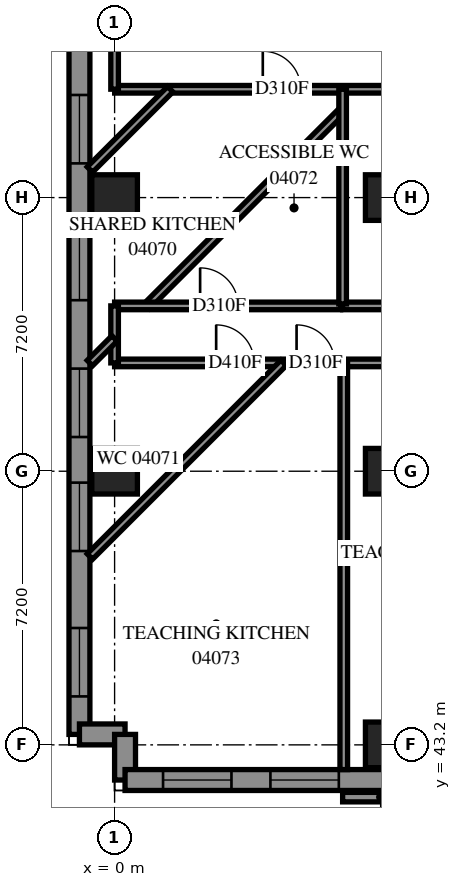
"""IFC4 building model, lengths in metres.
Left out: names, types, materials, properties, quantities, classifications, styles, units other than length and angle.
Written with IfcOpenShell. Run it as: python <this file> out.ifc"""

import sys

from ifc_helpers import new_model, si_unit, direction, frame, frame_2d, origin, origin_2d, place, context, subcontext, project, spatial, polyline, rectangle, outline, extrude, element, fill, save


model = new_model("IFC4")
c1 = context("Model", 3, precision=1e-05, world=origin(), true_north=direction((0.0, 1.0)))
c2 = subcontext(c1, "Body", "Model", "MODEL_VIEW")
j1 = project(units=[si_unit("LENGTHUNIT", "METRE"), si_unit("PLANEANGLEUNIT", "RADIAN")], contexts=[c1])
p1 = place(None, origin())
s1 = spatial("IfcSite", under=j1, at=p1, CompositionType="ELEMENT")
p2 = place(p1, origin())
s2 = spatial("IfcBuilding", under=s1, at=p2, CompositionType="ELEMENT")
p3 = place(p2, frame((0.0, 0.0, 18.6)))
s3 = spatial("IfcBuildingStorey", under=s2, at=p3, CompositionType="ELEMENT", Elevation=18.6)
for number, where, z_axis, x_axis in (
    (1, (0.0, 50.4, 0.0), (0.0, 0.0, 1.0), (1.0, 0.0, 0.0)),
    (2, (0.0, 57.6, 0.0), (0.0, 0.0, 1.0), (1.0, 0.0, 0.0)),
    (3, (7.2, 43.2, 0.0), (0.0, 0.0, 1.0), (1.0, 0.0, 0.0)),
    (4, (7.2, 50.4, 0.0), (0.0, 0.0, 1.0), (1.0, 0.0, 0.0)),
    (5, (7.2, 57.6, 0.0), (0.0, 0.0, 1.0), (1.0, 0.0, 0.0)),
):
    element("IfcColumn", number, at=place(p3, frame(where, z_axis=z_axis, x_axis=x_axis)), inside=s3, PredefinedType="COLUMN", context=c2, shape_type="SweptSolid", body=[
        extrude(rectangle(XDim=1.2, YDim=1.2, at=origin_2d()), origin(), (0.0, 0.0, 1.0), 3.8),
    ])
p4 = place(p3, frame((-0.925, 71.725, 0.0), z_axis=(0.0, 0.0, 1.0), x_axis=(0.0, -1.0, 0.0)))
e6 = element("IfcWall", 6, at=p4, inside=s3, PredefinedType="SOLIDWALL", context=c2, shape_type="SweptSolid", body=[
    extrude(outline(polyline([(-0.275, -0.275), (28.525, -0.275), (27.975, 0.275), (0.275, 0.275), (-0.275, -0.275)])), origin(), (0.0, 0.0, 1.0), 3.8),
])
p5 = place(p4, frame((1.0, 0.0, 0.7)))
e7 = element("IfcOpeningElement", 7, at=p5, cuts=e6, PredefinedType="OPENING", context=c2, shape_type="SweptSolid", body=[
    extrude(rectangle(XDim=1.8, YDim=2.4, at=frame_2d((0.9, 1.2))), frame((0.0, 0.285, 0.0), z_axis=(0.0, -1.0, 0.0), x_axis=(1.0, 0.0, 0.0)), (0.0, 0.0, 1.0), 0.57),
])
p6 = place(p4, frame((4.225, 0.0, 0.7)))
e8 = element("IfcOpeningElement", 8, at=p6, cuts=e6, PredefinedType="OPENING", context=c2, shape_type="SweptSolid", body=[
    extrude(rectangle(XDim=1.8, YDim=2.4, at=frame_2d((0.9, 1.2))), frame((0.0, 0.285, 0.0), z_axis=(0.0, -1.0, 0.0), x_axis=(1.0, 0.0, 0.0)), (0.0, 0.0, 1.0), 0.57),
])
p7 = place(p4, frame((7.825, 0.0, 0.7)))
e9 = element("IfcOpeningElement", 9, at=p7, cuts=e6, PredefinedType="OPENING", context=c2, shape_type="SweptSolid", body=[
    extrude(rectangle(XDim=1.8, YDim=2.4, at=frame_2d((0.9, 1.2))), frame((0.0, 0.285, 0.0), z_axis=(0.0, -1.0, 0.0), x_axis=(1.0, 0.0, 0.0)), (0.0, 0.0, 1.0), 0.57),
])
p8 = place(p4, frame((11.425, 0.0, 0.7)))
e10 = element("IfcOpeningElement", 10, at=p8, cuts=e6, PredefinedType="OPENING", context=c2, shape_type="SweptSolid", body=[
    extrude(rectangle(XDim=1.8, YDim=2.4, at=frame_2d((0.9, 1.2))), frame((0.0, 0.285, 0.0), z_axis=(0.0, -1.0, 0.0), x_axis=(1.0, 0.0, 0.0)), (0.0, 0.0, 1.0), 0.57),
])
p9 = place(p4, frame((15.025, 0.0, 0.7)))
e11 = element("IfcOpeningElement", 11, at=p9, cuts=e6, PredefinedType="OPENING", context=c2, shape_type="SweptSolid", body=[
    extrude(rectangle(XDim=1.8, YDim=2.4, at=frame_2d((0.9, 1.2))), frame((0.0, 0.285, 0.0), z_axis=(0.0, -1.0, 0.0), x_axis=(1.0, 0.0, 0.0)), (0.0, 0.0, 1.0), 0.57),
])
p10 = place(p4, frame((18.625, 0.0, 0.7)))
e12 = element("IfcOpeningElement", 12, at=p10, cuts=e6, PredefinedType="OPENING", context=c2, shape_type="SweptSolid", body=[
    extrude(rectangle(XDim=1.8, YDim=2.4, at=frame_2d((0.9, 1.2))), frame((0.0, 0.285, 0.0), z_axis=(0.0, -1.0, 0.0), x_axis=(1.0, 0.0, 0.0)), (0.0, 0.0, 1.0), 0.57),
])
p11 = place(p4, frame((21.625, 0.0, 0.7)))
e13 = element("IfcOpeningElement", 13, at=p11, cuts=e6, PredefinedType="OPENING", context=c2, shape_type="SweptSolid", body=[
    extrude(rectangle(XDim=1.8, YDim=2.4, at=frame_2d((0.9, 1.2))), frame((0.0, 0.285, 0.0), z_axis=(0.0, -1.0, 0.0), x_axis=(1.0, 0.0, 0.0)), (0.0, 0.0, 1.0), 0.57),
])
p12 = place(p4, frame((25.45, 0.0, 0.7)))
e14 = element("IfcOpeningElement", 14, at=p12, cuts=e6, PredefinedType="OPENING", context=c2, shape_type="SweptSolid", body=[
    extrude(rectangle(XDim=1.8, YDim=2.4, at=frame_2d((0.9, 1.2))), frame((0.0, 0.285, 0.0), z_axis=(0.0, -1.0, 0.0), x_axis=(1.0, 0.0, 0.0)), (0.0, 0.0, 1.0), 0.57),
])
p13 = place(p3, frame((-0.925, 43.475, 0.0), z_axis=(0.0, 0.0, 1.0), x_axis=(1.0, 0.0, 0.0)))
e15 = element("IfcWall", 15, at=p13, inside=s3, PredefinedType="SOLIDWALL", context=c2, shape_type="SweptSolid", body=[
    extrude(outline(polyline([(-0.275, -0.275), (0.925, -0.275), (1.475, 0.275), (0.275, 0.275), (-0.275, -0.275)])), origin(), (0.0, 0.0, 1.0), 3.8),
])
p14 = place(p3, frame((0.275, 43.475, 0.0), z_axis=(0.0, 0.0, 1.0), x_axis=(0.0, -1.0, 0.0)))
e16 = element("IfcWall", 16, at=p14, inside=s3, PredefinedType="SOLIDWALL", context=c2, shape_type="SweptSolid", body=[
    extrude(outline(polyline([(0.275, -0.275), (1.475, -0.275), (0.925, 0.275), (-0.275, 0.275), (0.275, -0.275)])), origin(), (0.0, 0.0, 1.0), 3.8),
])
p15 = place(p3, frame((0.275, 42.275, 0.0), z_axis=(0.0, 0.0, 1.0), x_axis=(1.0, 0.0, 0.0)))
e17 = element("IfcWall", 17, at=p15, inside=s3, PredefinedType="SOLIDWALL", context=c2, shape_type="SweptSolid", body=[
    extrude(outline(polyline([(-0.275, -0.275), (12.925, -0.275), (13.475, 0.275), (0.275, 0.275), (-0.275, -0.275)])), origin(), (0.0, 0.0, 1.0), 3.8),
])
p16 = place(p15, frame((1.0, 0.0, 0.7)))
e18 = element("IfcOpeningElement", 18, at=p16, cuts=e17, PredefinedType="OPENING", context=c2, shape_type="SweptSolid", body=[
    extrude(rectangle(XDim=1.8, YDim=2.4, at=frame_2d((0.9, 1.2))), frame((0.0, 0.285, 0.0), z_axis=(0.0, -1.0, 0.0), x_axis=(1.0, 0.0, 0.0)), (0.0, 0.0, 1.0), 0.57),
])
p17 = place(p15, frame((3.825, 0.0, 0.7)))
e19 = element("IfcOpeningElement", 19, at=p17, cuts=e17, PredefinedType="OPENING", context=c2, shape_type="SweptSolid", body=[
    extrude(rectangle(XDim=1.8, YDim=2.4, at=frame_2d((0.9, 1.2))), frame((0.0, 0.285, 0.0), z_axis=(0.0, -1.0, 0.0), x_axis=(1.0, 0.0, 0.0)), (0.0, 0.0, 1.0), 0.57),
])
p18 = place(p15, frame((7.825, 0.0, 0.7)))
e20 = element("IfcOpeningElement", 20, at=p18, cuts=e17, PredefinedType="OPENING", context=c2, shape_type="SweptSolid", body=[
    extrude(rectangle(XDim=1.8, YDim=2.4, at=frame_2d((0.9, 1.2))), frame((0.0, 0.285, 0.0), z_axis=(0.0, -1.0, 0.0), x_axis=(1.0, 0.0, 0.0)), (0.0, 0.0, 1.0), 0.57),
])
p19 = place(p15, frame((10.863, 0.0, 0.7)))
e21 = element("IfcOpeningElement", 21, at=p19, cuts=e17, PredefinedType="OPENING", context=c2, shape_type="SweptSolid", body=[
    extrude(rectangle(XDim=1.8, YDim=2.4, at=frame_2d((0.9, 1.2))), frame((0.0, 0.285, 0.0), z_axis=(0.0, -1.0, 0.0), x_axis=(1.0, 0.0, 0.0)), (0.0, 0.0, 1.0), 0.57),
])
p20 = place(p3, frame((0.0, 53.25, 0.0), z_axis=(0.0, 0.0, 1.0), x_axis=(1.0, 0.0, 0.0)))
e22 = element("IfcWall", 22, at=p20, inside=s3, PredefinedType="PARTITIONING", context=c2, shape_type="SweptSolid", body=[
    extrude(rectangle(XDim=55.1, YDim=0.2, at=frame_2d((27.55, 0.0))), origin(), (0.0, 0.0, 1.0), 3.8),
])
p21 = place(p20, frame((8.669, 0.0, 0.0)))
e23 = element("IfcOpeningElement", 23, at=p21, cuts=e22, PredefinedType="OPENING", context=c2, shape_type="SweptSolid", body=[
    extrude(rectangle(XDim=1.0, YDim=2.1, at=frame_2d((0.5, 1.05))), frame((0.0, 0.11, 0.0), z_axis=(0.0, -1.0, 0.0), x_axis=(1.0, 0.0, 0.0)), (0.0, 0.0, 1.0), 0.22),
])
p22 = place(p20, frame((11.635, 0.0, 0.0)))
e24 = element("IfcOpeningElement", 24, at=p22, cuts=e22, PredefinedType="OPENING", context=c2, shape_type="SweptSolid", body=[
    extrude(rectangle(XDim=1.0, YDim=2.1, at=frame_2d((0.5, 1.05))), frame((0.0, 0.11, 0.0), z_axis=(0.0, -1.0, 0.0), x_axis=(1.0, 0.0, 0.0)), (0.0, 0.0, 1.0), 0.22),
])
p23 = place(p20, frame((16.165, 0.0, 0.0)))
e25 = element("IfcOpeningElement", 25, at=p23, cuts=e22, PredefinedType="OPENING", context=c2, shape_type="SweptSolid", body=[
    extrude(rectangle(XDim=1.0, YDim=2.1, at=frame_2d((0.5, 1.05))), frame((0.0, 0.11, 0.0), z_axis=(0.0, -1.0, 0.0), x_axis=(1.0, 0.0, 0.0)), (0.0, 0.0, 1.0), 0.22),
])
p24 = place(p20, frame((20.337, 0.0, 0.0)))
e26 = element("IfcOpeningElement", 26, at=p24, cuts=e22, PredefinedType="OPENING", context=c2, shape_type="SweptSolid", body=[
    extrude(rectangle(XDim=1.0, YDim=2.1, at=frame_2d((0.5, 1.05))), frame((0.0, 0.11, 0.0), z_axis=(0.0, -1.0, 0.0), x_axis=(1.0, 0.0, 0.0)), (0.0, 0.0, 1.0), 0.22),
])
p25 = place(p20, frame((27.538, 0.0, 0.0)))
e27 = element("IfcOpeningElement", 27, at=p25, cuts=e22, PredefinedType="OPENING", context=c2, shape_type="SweptSolid", body=[
    extrude(rectangle(XDim=1.0, YDim=2.1, at=frame_2d((0.5, 1.05))), frame((0.0, 0.11, 0.0), z_axis=(0.0, -1.0, 0.0), x_axis=(1.0, 0.0, 0.0)), (0.0, 0.0, 1.0), 0.22),
])
p26 = place(p20, frame((34.737, 0.0, 0.0)))
e28 = element("IfcOpeningElement", 28, at=p26, cuts=e22, PredefinedType="OPENING", context=c2, shape_type="SweptSolid", body=[
    extrude(rectangle(XDim=1.0, YDim=2.1, at=frame_2d((0.5, 1.05))), frame((0.0, 0.11, 0.0), z_axis=(0.0, -1.0, 0.0), x_axis=(1.0, 0.0, 0.0)), (0.0, 0.0, 1.0), 0.22),
])
p27 = place(p20, frame((40.125, 0.0, 0.0)))
e29 = element("IfcOpeningElement", 29, at=p27, cuts=e22, PredefinedType="OPENING", context=c2, shape_type="SweptSolid", body=[
    extrude(rectangle(XDim=1.0, YDim=2.1, at=frame_2d((0.5, 1.05))), frame((0.0, 0.11, 0.0), z_axis=(0.0, -1.0, 0.0), x_axis=(1.0, 0.0, 0.0)), (0.0, 0.0, 1.0), 0.22),
])
p28 = place(p20, frame((46.758, 0.0, 0.0)))
e30 = element("IfcOpeningElement", 30, at=p28, cuts=e22, PredefinedType="OPENING", context=c2, shape_type="SweptSolid", body=[
    extrude(rectangle(XDim=1.0, YDim=2.1, at=frame_2d((0.5, 1.05))), frame((0.0, 0.11, 0.0), z_axis=(0.0, -1.0, 0.0), x_axis=(1.0, 0.0, 0.0)), (0.0, 0.0, 1.0), 0.22),
])
p29 = place(p20, frame((53.913, 0.0, 0.0)))
e31 = element("IfcOpeningElement", 31, at=p29, cuts=e22, PredefinedType="OPENING", context=c2, shape_type="SweptSolid", body=[
    extrude(rectangle(XDim=1.0, YDim=2.1, at=frame_2d((0.5, 1.05))), frame((0.0, 0.11, 0.0), z_axis=(0.0, -1.0, 0.0), x_axis=(1.0, 0.0, 0.0)), (0.0, 0.0, 1.0), 0.22),
])
p30 = place(p20, frame((2.672, 0.0, 0.0)))
e32 = element("IfcOpeningElement", 32, at=p30, cuts=e22, PredefinedType="OPENING", context=c2, shape_type="SweptSolid", body=[
    extrude(rectangle(XDim=1.0, YDim=2.1, at=frame_2d((0.5, 1.05))), frame((0.0, 0.11, 0.0), z_axis=(0.0, -1.0, 0.0), x_axis=(1.0, 0.0, 0.0)), (0.0, 0.0, 1.0), 0.22),
])
p31 = place(p20, frame((4.788, 0.0, 0.0)))
e33 = element("IfcOpeningElement", 33, at=p31, cuts=e22, PredefinedType="OPENING", context=c2, shape_type="SweptSolid", body=[
    extrude(rectangle(XDim=1.0, YDim=2.1, at=frame_2d((0.5, 1.05))), frame((0.0, 0.11, 0.0), z_axis=(0.0, -1.0, 0.0), x_axis=(1.0, 0.0, 0.0)), (0.0, 0.0, 1.0), 0.22),
])
p32 = place(p3, frame((0.002, 60.45, 0.0), z_axis=(0.0, 0.0, 1.0), x_axis=(1.0, 0.0, 0.0)))
e34 = element("IfcWall", 34, at=p32, inside=s3, PredefinedType="PARTITIONING", context=c2, shape_type="SweptSolid", body=[
    extrude(rectangle(XDim=55.098, YDim=0.2, at=frame_2d((27.549, 0.0))), origin(), (0.0, 0.0, 1.0), 3.8),
])
p33 = place(p32, frame((49.69, 0.0, 0.0)))
e35 = element("IfcOpeningElement", 35, at=p33, cuts=e34, PredefinedType="OPENING", context=c2, shape_type="SweptSolid", body=[
    extrude(rectangle(XDim=1.0, YDim=2.1, at=frame_2d((0.5, 1.05))), frame((0.0, 0.11, 0.0), z_axis=(0.0, -1.0, 0.0), x_axis=(1.0, 0.0, 0.0)), (0.0, 0.0, 1.0), 0.22),
])
p34 = place(p32, frame((3.897, 0.0, 0.0)))
e36 = element("IfcOpeningElement", 36, at=p34, cuts=e34, PredefinedType="OPENING", context=c2, shape_type="SweptSolid", body=[
    extrude(rectangle(XDim=1.0, YDim=2.1, at=frame_2d((0.5, 1.05))), frame((0.0, 0.11, 0.0), z_axis=(0.0, -1.0, 0.0), x_axis=(1.0, 0.0, 0.0)), (0.0, 0.0, 1.0), 0.22),
])
p35 = place(p3, frame((6.0, 54.75, 0.0), z_axis=(0.0, 0.0, 1.0), x_axis=(1.0, 0.0, 0.0)))
e37 = element("IfcWall", 37, at=p35, inside=s3, PredefinedType="PARTITIONING", context=c2, shape_type="SweptSolid", body=[
    extrude(rectangle(XDim=49.1, YDim=0.2, at=frame_2d((24.55, 0.0))), origin(), (0.0, 0.0, 1.0), 3.8),
])
p36 = place(p35, frame((6.284, 0.0, 0.0)))
e38 = element("IfcOpeningElement", 38, at=p36, cuts=e37, PredefinedType="OPENING", context=c2, shape_type="SweptSolid", body=[
    extrude(rectangle(XDim=1.0, YDim=2.1, at=frame_2d((0.5, 1.05))), frame((0.0, 0.11, 0.0), z_axis=(0.0, -1.0, 0.0), x_axis=(1.0, 0.0, 0.0)), (0.0, 0.0, 1.0), 0.22),
])
p37 = place(p35, frame((14.374, 0.0, 0.0)))
e39 = element("IfcOpeningElement", 39, at=p37, cuts=e37, PredefinedType="OPENING", context=c2, shape_type="SweptSolid", body=[
    extrude(rectangle(XDim=1.0, YDim=2.1, at=frame_2d((0.5, 1.05))), frame((0.0, 0.11, 0.0), z_axis=(0.0, -1.0, 0.0), x_axis=(1.0, 0.0, 0.0)), (0.0, 0.0, 1.0), 0.22),
])
p38 = place(p35, frame((19.725, 0.0, 0.0)))
e40 = element("IfcOpeningElement", 40, at=p38, cuts=e37, PredefinedType="OPENING", context=c2, shape_type="SweptSolid", body=[
    extrude(rectangle(XDim=1.0, YDim=2.1, at=frame_2d((0.5, 1.05))), frame((0.0, 0.11, 0.0), z_axis=(0.0, -1.0, 0.0), x_axis=(1.0, 0.0, 0.0)), (0.0, 0.0, 1.0), 0.22),
])
p39 = place(p35, frame((28.183, 0.0, 0.0)))
e41 = element("IfcOpeningElement", 41, at=p39, cuts=e37, PredefinedType="OPENING", context=c2, shape_type="SweptSolid", body=[
    extrude(rectangle(XDim=1.0, YDim=2.1, at=frame_2d((0.5, 1.05))), frame((0.0, 0.11, 0.0), z_axis=(0.0, -1.0, 0.0), x_axis=(1.0, 0.0, 0.0)), (0.0, 0.0, 1.0), 0.22),
])
p40 = place(p35, frame((35.974, 0.0, 0.0)))
e42 = element("IfcOpeningElement", 42, at=p40, cuts=e37, PredefinedType="OPENING", context=c2, shape_type="SweptSolid", body=[
    extrude(rectangle(XDim=1.0, YDim=2.1, at=frame_2d((0.5, 1.05))), frame((0.0, 0.11, 0.0), z_axis=(0.0, -1.0, 0.0), x_axis=(1.0, 0.0, 0.0)), (0.0, 0.0, 1.0), 0.22),
])
p41 = place(p3, frame((6.03, 42.55, 0.0), z_axis=(0.0, 0.0, 1.0), x_axis=(0.0, 1.0, 0.0)))
e43 = element("IfcWall", 43, at=p41, inside=s3, PredefinedType="PARTITIONING", context=c2, shape_type="SweptSolid", body=[
    extrude(rectangle(XDim=10.7, YDim=0.2, at=frame_2d((5.35, 0.0))), origin(), (0.0, 0.0, 1.0), 3.8),
])
p42 = place(p3, frame((0.855, 54.751, 0.0), z_axis=(0.0, 0.0, 1.0), x_axis=(0.7071067812, 0.7071067812, 0.0)))
e44 = element("IfcWall", 44, at=p42, inside=s3, PredefinedType="PARTITIONING", context=c2, shape_type="SweptSolid", body=[
    extrude(rectangle(XDim=7.275, YDim=0.2, at=frame_2d((3.637, 0.0))), origin(), (0.0, 0.0, 1.0), 3.8),
])
p43 = place(p3, frame((-0.65, 48.154, 0.0), z_axis=(0.0, 0.0, 1.0), x_axis=(0.7070998443, 0.707113718, 0.0)))
e45 = element("IfcWall", 45, at=p43, inside=s3, PredefinedType="PARTITIONING", context=c2, shape_type="SweptSolid", body=[
    extrude(rectangle(XDim=7.208, YDim=0.2, at=frame_2d((3.604, 0.0))), origin(), (0.0, 0.0, 1.0), 3.8),
])
p44 = place(p3, frame((0.0, 54.75, 0.0), z_axis=(0.0, 0.0, 1.0), x_axis=(1.0, 0.0, 0.0)))
e46 = element("IfcWall", 46, at=p44, inside=s3, PredefinedType="PARTITIONING", context=c2, shape_type="SweptSolid", body=[
    extrude(rectangle(XDim=5.948, YDim=0.2, at=frame_2d((2.974, 0.0))), origin(), (0.0, 0.0, 1.0), 3.8),
])
p45 = place(p44, frame((2.25, 0.0, 0.0)))
e47 = element("IfcOpeningElement", 47, at=p45, cuts=e46, PredefinedType="OPENING", context=c2, shape_type="SweptSolid", body=[
    extrude(rectangle(XDim=1.0, YDim=2.1, at=frame_2d((0.5, 1.05))), frame((0.0, 0.11, 0.0), z_axis=(0.0, -1.0, 0.0), x_axis=(1.0, 0.0, 0.0)), (0.0, 0.0, 1.0), 0.22),
])
p46 = place(p3, frame((6.0, 54.802, 0.0), z_axis=(0.0, 0.0, 1.0), x_axis=(0.0, 1.0, 0.0)))
e48 = element("IfcWall", 48, at=p46, inside=s3, PredefinedType="PARTITIONING", context=c2, shape_type="SweptSolid", body=[
    extrude(rectangle(XDim=5.648, YDim=0.2, at=frame_2d((2.824, 0.0))), origin(), (0.0, 0.0, 1.0), 3.8),
])
p47 = place(p3, frame((-0.65, 58.337, 0.0), z_axis=(0.0, 0.0, 1.0), x_axis=(0.7071067812, 0.7071067812, 0.0)))
e49 = element("IfcWall", 49, at=p47, inside=s3, PredefinedType="PARTITIONING", context=c2, shape_type="SweptSolid", body=[
    extrude(rectangle(XDim=2.989, YDim=0.2, at=frame_2d((1.495, 0.0))), origin(), (0.0, 0.0, 1.0), 3.8),
])
p48 = place(p3, frame((0.0, 53.25, 0.0), z_axis=(0.0, 0.0, 1.0), x_axis=(0.0, 1.0, 0.0)))
e50 = element("IfcWall", 50, at=p48, inside=s3, PredefinedType="PARTITIONING", context=c2, shape_type="SweptSolid", body=[
    extrude(rectangle(XDim=1.5, YDim=0.2, at=frame_2d((0.75, 0.0))), origin(), (0.0, 0.0, 1.0), 3.2),
])
p49 = place(p3, frame((0.0, 60.452, 0.0), z_axis=(0.0, 0.0, 1.0), x_axis=(0.0, 1.0, 0.0)))
e51 = element("IfcWall", 51, at=p49, inside=s3, PredefinedType="PARTITIONING", context=c2, shape_type="SweptSolid", body=[
    extrude(rectangle(XDim=1.496, YDim=0.2, at=frame_2d((0.748, 0.0))), origin(), (0.0, 0.0, 1.0), 3.2),
])
p50 = place(p3, frame((-0.65, 53.246, 0.0), z_axis=(0.0, 0.0, 1.0), x_axis=(0.7071612431, 0.707052315, 0.0)))
e52 = element("IfcWall", 52, at=p50, inside=s3, PredefinedType="PARTITIONING", context=c2, shape_type="SweptSolid", body=[
    extrude(rectangle(XDim=0.918, YDim=0.2, at=frame_2d((0.459, 0.0))), origin(), (0.0, 0.0, 1.0), 3.8),
])
p51 = place(p3, frame((8.0, 41.825, 0.0), z_axis=(0.0, 0.0, 1.0), x_axis=(-1.0, 0.0, 0.0)))
e53 = element("IfcWall", 53, at=p51, inside=s3, PredefinedType="SOLIDWALL", context=c2, shape_type="SweptSolid", body=[
    extrude(rectangle(XDim=2.0, YDim=0.25, at=frame_2d((1.0, 0.0))), origin(), (0.0, 0.0, 1.0), 3.8),
])
p52 = place(p8, origin())
e54 = element("IfcWindow", 54, at=p52, inside=s3, PartitioningType="SINGLE_PANEL", PredefinedType="WINDOW", context=c2, shape_type="SweptSolid", body=[
    extrude(rectangle(XDim=1.8, YDim=2.4, at=frame_2d((0.9, 1.2))), frame((0.0, 0.155, 0.0), z_axis=(0.0, -1.0, 0.0), x_axis=(1.0, 0.0, 0.0)), (0.0, 0.0, 1.0), 0.06),
])
fill(e10, e54)
p53 = place(p9, origin())
e55 = element("IfcWindow", 55, at=p53, inside=s3, PartitioningType="SINGLE_PANEL", PredefinedType="WINDOW", context=c2, shape_type="SweptSolid", body=[
    extrude(rectangle(XDim=1.8, YDim=2.4, at=frame_2d((0.9, 1.2))), frame((0.0, 0.155, 0.0), z_axis=(0.0, -1.0, 0.0), x_axis=(1.0, 0.0, 0.0)), (0.0, 0.0, 1.0), 0.06),
])
fill(e11, e55)
p54 = place(p10, origin())
e56 = element("IfcWindow", 56, at=p54, inside=s3, PartitioningType="SINGLE_PANEL", PredefinedType="WINDOW", context=c2, shape_type="SweptSolid", body=[
    extrude(rectangle(XDim=1.8, YDim=2.4, at=frame_2d((0.9, 1.2))), frame((0.0, 0.155, 0.0), z_axis=(0.0, -1.0, 0.0), x_axis=(1.0, 0.0, 0.0)), (0.0, 0.0, 1.0), 0.06),
])
fill(e12, e56)
p55 = place(p11, origin())
e57 = element("IfcWindow", 57, at=p55, inside=s3, PartitioningType="SINGLE_PANEL", PredefinedType="WINDOW", context=c2, shape_type="SweptSolid", body=[
    extrude(rectangle(XDim=1.8, YDim=2.4, at=frame_2d((0.9, 1.2))), frame((0.0, 0.155, 0.0), z_axis=(0.0, -1.0, 0.0), x_axis=(1.0, 0.0, 0.0)), (0.0, 0.0, 1.0), 0.06),
])
fill(e13, e57)
p56 = place(p12, origin())
e58 = element("IfcWindow", 58, at=p56, inside=s3, PartitioningType="SINGLE_PANEL", PredefinedType="WINDOW", context=c2, shape_type="SweptSolid", body=[
    extrude(rectangle(XDim=1.8, YDim=2.4, at=frame_2d((0.9, 1.2))), frame((0.0, 0.155, 0.0), z_axis=(0.0, -1.0, 0.0), x_axis=(1.0, 0.0, 0.0)), (0.0, 0.0, 1.0), 0.06),
])
fill(e14, e58)
p57 = place(p16, origin())
e59 = element("IfcWindow", 59, at=p57, inside=s3, PartitioningType="SINGLE_PANEL", PredefinedType="WINDOW", context=c2, shape_type="SweptSolid", body=[
    extrude(rectangle(XDim=1.8, YDim=2.4, at=frame_2d((0.9, 1.2))), frame((0.0, 0.155, 0.0), z_axis=(0.0, -1.0, 0.0), x_axis=(1.0, 0.0, 0.0)), (0.0, 0.0, 1.0), 0.06),
])
fill(e18, e59)
p58 = place(p17, origin())
e60 = element("IfcWindow", 60, at=p58, inside=s3, PartitioningType="SINGLE_PANEL", PredefinedType="WINDOW", context=c2, shape_type="SweptSolid", body=[
    extrude(rectangle(XDim=1.8, YDim=2.4, at=frame_2d((0.9, 1.2))), frame((0.0, 0.155, 0.0), z_axis=(0.0, -1.0, 0.0), x_axis=(1.0, 0.0, 0.0)), (0.0, 0.0, 1.0), 0.06),
])
fill(e19, e60)
p59 = place(p34, origin())
e61 = element("IfcDoor", 61, at=p59, inside=s3, OperationType="SINGLE_SWING_LEFT", PredefinedType="DOOR", context=c2, shape_type="SweptSolid", body=[
    extrude(rectangle(XDim=1.0, YDim=2.1, at=frame_2d((0.5, 1.05))), frame((0.0, 0.025, 0.0), z_axis=(0.0, -1.0, 0.0), x_axis=(1.0, 0.0, 0.0)), (0.0, 0.0, 1.0), 0.05),
])
fill(e36, e61)
p60 = place(p30, origin())
e62 = element("IfcDoor", 62, at=p60, inside=s3, OperationType="SINGLE_SWING_RIGHT", PredefinedType="DOOR", context=c2, shape_type="SweptSolid", body=[
    extrude(rectangle(XDim=1.0, YDim=2.1, at=frame_2d((0.5, 1.05))), frame((0.0, 0.025, 0.0), z_axis=(0.0, -1.0, 0.0), x_axis=(1.0, 0.0, 0.0)), (0.0, 0.0, 1.0), 0.05),
])
fill(e32, e62)
p61 = place(p45, origin())
e63 = element("IfcDoor", 63, at=p61, inside=s3, OperationType="SINGLE_SWING_LEFT", PredefinedType="DOOR", context=c2, shape_type="SweptSolid", body=[
    extrude(rectangle(XDim=1.0, YDim=2.1, at=frame_2d((0.5, 1.05))), frame((0.0, 0.025, 0.0), z_axis=(0.0, -1.0, 0.0), x_axis=(1.0, 0.0, 0.0)), (0.0, 0.0, 1.0), 0.05),
])
fill(e47, e63)
p62 = place(p31, origin())
e64 = element("IfcDoor", 64, at=p62, inside=s3, OperationType="SINGLE_SWING_LEFT", PredefinedType="DOOR", context=c2, shape_type="SweptSolid", body=[
    extrude(rectangle(XDim=1.0, YDim=2.1, at=frame_2d((0.5, 1.05))), frame((0.0, 0.025, 0.0), z_axis=(0.0, -1.0, 0.0), x_axis=(1.0, 0.0, 0.0)), (0.0, 0.0, 1.0), 0.05),
])
fill(e33, e64)
save(model, sys.argv[1])
